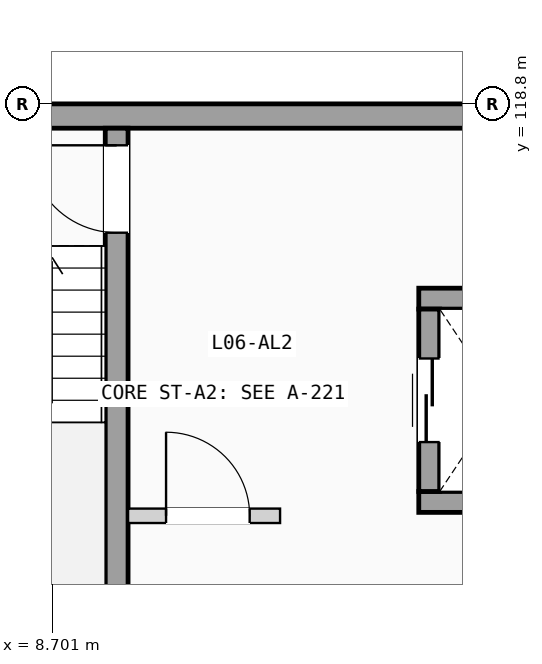
"""IFC4 building model, lengths in metres.
Left out: names, types, materials, properties, quantities, classifications, styles, units other than length and angle.
Written with IfcOpenShell. Run it as: python <this file> out.ifc"""

import sys

from ifc_helpers import new_model, si_unit, direction, frame, frame_2d, origin, place, context, subcontext, project, spatial, rectangle, extrude, element, fill, save


model = new_model("IFC4")
c1 = context("Model", 3, precision=1e-05, world=origin(), true_north=direction((0.0, 1.0)))
c2 = subcontext(c1, "Body", "Model", "MODEL_VIEW")
j1 = project(units=[si_unit("LENGTHUNIT", "METRE"), si_unit("PLANEANGLEUNIT", "RADIAN")], contexts=[c1])
p1 = place(None, origin())
s1 = spatial("IfcSite", under=j1, at=p1, CompositionType="ELEMENT")
p2 = place(p1, origin())
s2 = spatial("IfcBuilding", under=s1, at=p2, CompositionType="ELEMENT")
p3 = place(p2, frame((0.0, 0.0, 21.525)))
s3 = spatial("IfcBuildingStorey", under=s2, at=p3, CompositionType="ELEMENT", Elevation=21.525)
p4 = place(p3, frame((0.0, 118.64, 0.0), z_axis=(0.0, 0.0, 1.0), x_axis=(1.0, 0.0, 0.0)))
e1 = element("IfcWall", 1, at=p4, inside=s3, PredefinedType="SOLIDWALL", context=c2, shape_type="SweptSolid", body=[
    extrude(rectangle(XDim=21.6, YDim=0.32, at=frame_2d((10.8, 0.0))), origin(), (0.0, 0.0, 1.0), 2.89),
])
p5 = place(p3, frame((9.55, 111.48, 0.0), z_axis=(0.0, 0.0, 1.0), x_axis=(0.0, 1.0, 0.0)))
e2 = element("IfcWall", 2, at=p5, inside=s3, PredefinedType="SHEAR", context=c2, shape_type="SweptSolid", body=[
    extrude(rectangle(XDim=7.0, YDim=0.3, at=frame_2d((3.5, 0.0))), origin(), (0.0, 0.0, 1.0), 2.89),
])
p6 = place(p5, frame((5.625, 0.0, 0.0)))
e3 = element("IfcOpeningElement", 3, at=p6, cuts=e2, PredefinedType="OPENING", context=c2, shape_type="SweptSolid", body=[
    extrude(rectangle(XDim=1.15, YDim=2.12, at=frame_2d((0.575, 1.06))), frame((0.0, 0.16, 0.0), z_axis=(0.0, -1.0, 0.0), x_axis=(1.0, 0.0, 0.0)), (0.0, 0.0, 1.0), 0.32),
])
for number, where, z_axis, x_axis in (
    (4, (13.525, 113.562, 0.0), (0.0, 0.0, 1.0), (1.0, 0.0, 0.0)),
    (5, (13.525, 116.238, 0.0), (0.0, 0.0, 1.0), (1.0, 0.0, 0.0)),
):
    element("IfcWall", number, at=place(p3, frame(where, z_axis=z_axis, x_axis=x_axis)), inside=s3, PredefinedType="SHEAR", context=c2, shape_type="SweptSolid", body=[
        extrude(rectangle(XDim=2.15, YDim=0.275, at=frame_2d((1.075, 0.0))), origin(), (0.0, 0.0, 1.0), 2.89),
    ])
p7 = place(p3, frame((13.663, 113.7, 0.0), z_axis=(0.0, 0.0, 1.0), x_axis=(0.0, 1.0, 0.0)))
e6 = element("IfcWall", 6, at=p7, inside=s3, PredefinedType="SHEAR", context=c2, shape_type="SweptSolid", body=[
    extrude(rectangle(XDim=2.4, YDim=0.275, at=frame_2d((1.2, 0.0))), origin(), (0.0, 0.0, 1.0), 2.89),
])
p8 = place(p7, frame((0.65, 0.0, 0.0)))
e7 = element("IfcOpeningElement", 7, at=p8, cuts=e6, PredefinedType="OPENING", context=c2, shape_type="SweptSolid", body=[
    extrude(rectangle(XDim=1.1, YDim=2.15, at=frame_2d((0.55, 1.075))), frame((0.0, 0.147, 0.0), z_axis=(0.0, -1.0, 0.0), x_axis=(1.0, 0.0, 0.0)), (0.0, 0.0, 1.0), 0.295),
])
p9 = place(p3, frame((9.7, 113.38, 0.0), z_axis=(0.0, 0.0, 1.0), x_axis=(1.0, 0.0, 0.0)))
e8 = element("IfcWall", 8, at=p9, inside=s3, PredefinedType="PARTITIONING", context=c2, shape_type="SweptSolid", body=[
    extrude(rectangle(XDim=2.0, YDim=0.19, at=frame_2d((1.0, 0.0))), origin(), (0.0, 0.0, 1.0), 2.87),
])
p10 = place(p9, frame((0.5, 0.0, 0.0)))
e9 = element("IfcOpeningElement", 9, at=p10, cuts=e8, PredefinedType="OPENING", context=c2, shape_type="SweptSolid", body=[
    extrude(rectangle(XDim=1.1, YDim=2.12, at=frame_2d((0.55, 1.06))), frame((0.0, 0.105, 0.0), z_axis=(0.0, -1.0, 0.0), x_axis=(1.0, 0.0, 0.0)), (0.0, 0.0, 1.0), 0.21),
])
p11 = place(p6, origin())
e10 = element("IfcDoor", 10, at=p11, inside=s3, OperationType="SINGLE_SWING_RIGHT", PredefinedType="DOOR", context=c2, shape_type="SweptSolid", body=[
    extrude(rectangle(XDim=1.15, YDim=2.12, at=frame_2d((0.575, 1.06))), frame((0.0, 0.025, 0.0), z_axis=(0.0, -1.0, 0.0), x_axis=(1.0, 0.0, 0.0)), (0.0, 0.0, 1.0), 0.05),
])
fill(e3, e10)
p12 = place(p8, origin())
e11 = element("IfcDoor", 11, at=p12, inside=s3, OperationType="SLIDING_TO_LEFT", PredefinedType="DOOR", context=c2, shape_type="SweptSolid", body=[
    extrude(rectangle(XDim=1.1, YDim=2.15, at=frame_2d((0.55, 1.075))), frame((0.0, 0.025, 0.0), z_axis=(0.0, -1.0, 0.0), x_axis=(1.0, 0.0, 0.0)), (0.0, 0.0, 1.0), 0.05),
])
fill(e7, e11)
p13 = place(p10, origin())
e12 = element("IfcDoor", 12, at=p13, inside=s3, OperationType="SINGLE_SWING_LEFT", PredefinedType="DOOR", context=c2, shape_type="SweptSolid", body=[
    extrude(rectangle(XDim=1.1, YDim=2.12, at=frame_2d((0.55, 1.06))), frame((0.0, 0.025, 0.0), z_axis=(0.0, -1.0, 0.0), x_axis=(1.0, 0.0, 0.0)), (0.0, 0.0, 1.0), 0.05),
])
fill(e9, e12)
save(model, sys.argv[1])
